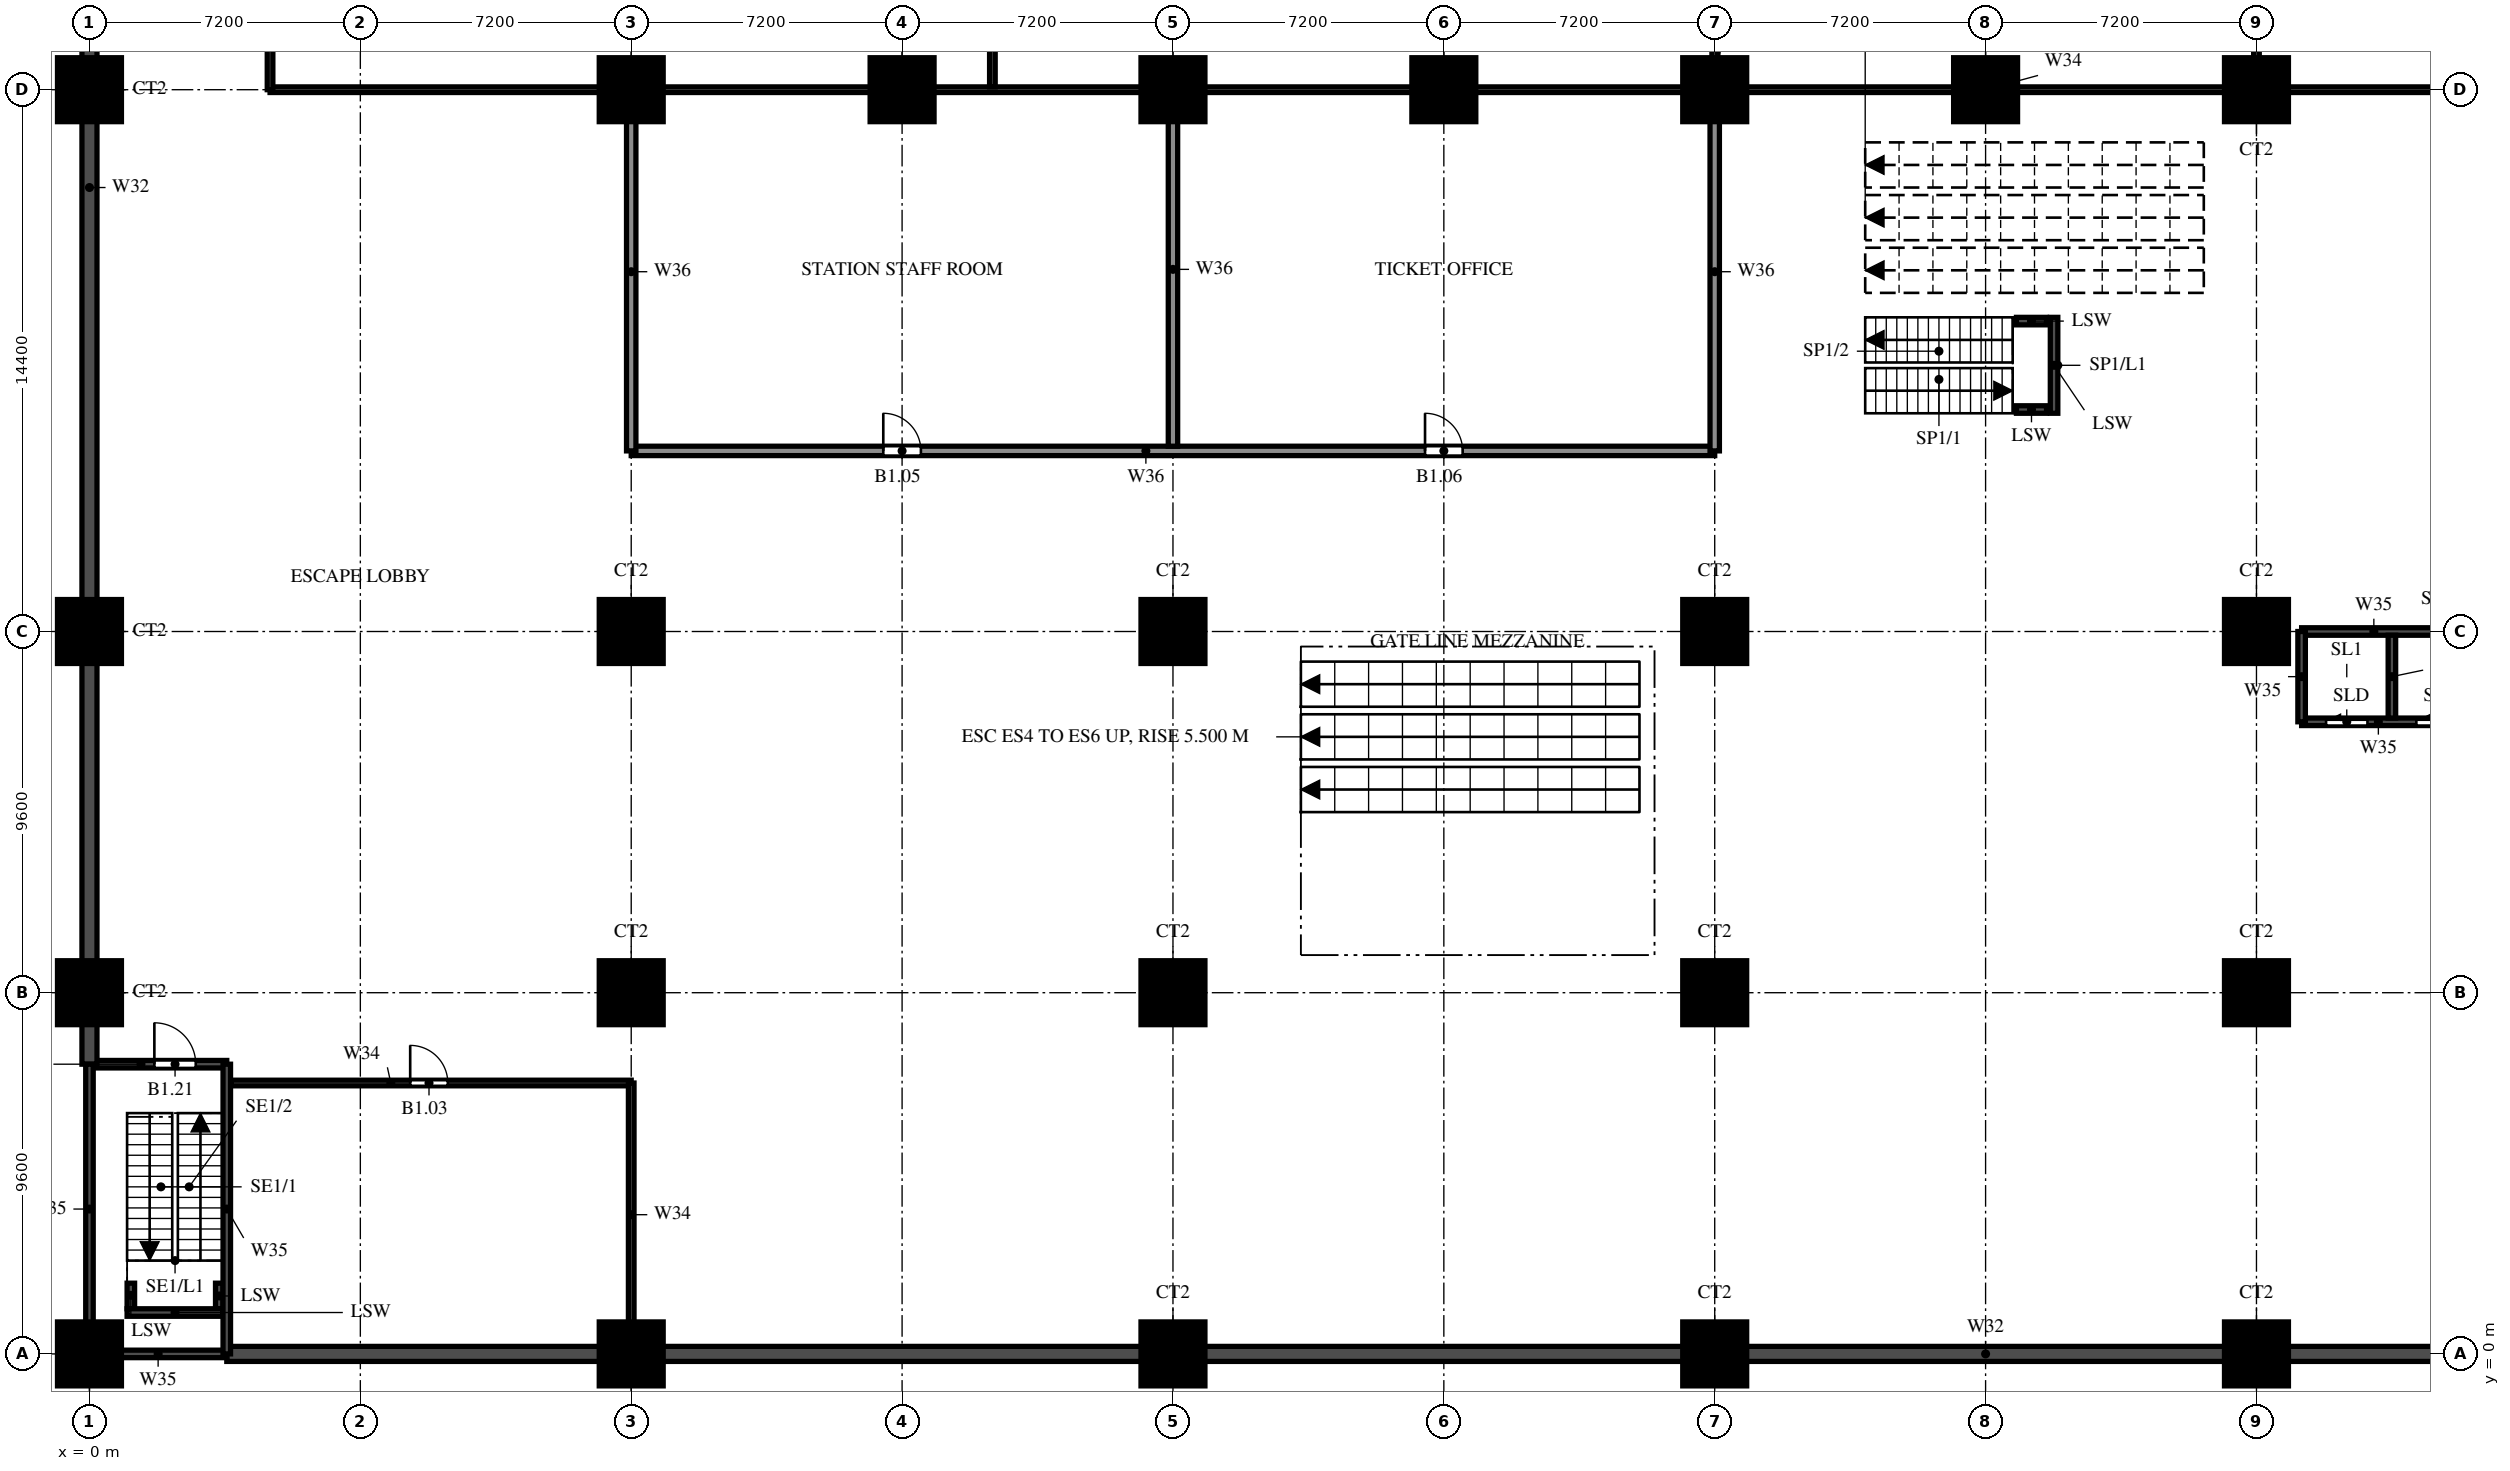
"""IFC4 building model, lengths in metres.
Left out: names, types, materials, properties, quantities, classifications, styles, units other than length and angle.
Written with IfcOpenShell. Run it as: python <this file> out.ifc"""

import sys

from ifc_helpers import new_model, si_unit, direction, frame, frame_2d, origin, origin_with_axes, origin_2d, place, context, subcontext, project, spatial, rectangle, extrude, source, transform, mapped, element, fill, save


model = new_model("IFC4")
c1 = context("Model", 3, precision=1e-05, world=origin(), true_north=direction((0.0, 1.0)))
c2 = subcontext(c1, "Body", "Model", "MODEL_VIEW")
j1 = project(units=[si_unit("LENGTHUNIT", "METRE"), si_unit("PLANEANGLEUNIT", "RADIAN")], contexts=[c1])
p1 = place(None, origin())
s1 = spatial("IfcSite", under=j1, at=p1, CompositionType="ELEMENT")
p2 = place(p1, origin())
s2 = spatial("IfcBuilding", under=s1, at=p2, CompositionType="ELEMENT")
p3 = place(p2, frame((0.0, 0.0, -5.4)))
s3 = spatial("IfcBuildingStorey", under=s2, at=p3, CompositionType="ELEMENT", Elevation=-5.4)
m1 = source(origin(), c2, "Body", "SweptSolid", [
    extrude(rectangle(XDim=1.7, YDim=1.7, at=origin_2d()), origin(), (0.0, 0.0, 1.0), 5.0),
])
for number, where, z_axis, x_axis in (
    (1, (0.0, 0.0, 0.0), (0.0, 0.0, 1.0), (1.0, 0.0, 0.0)),
    (2, (14.4, 0.0, 0.0), (0.0, 0.0, 1.0), (1.0, 0.0, 0.0)),
    (3, (28.8, 0.0, 0.0), (0.0, 0.0, 1.0), (1.0, 0.0, 0.0)),
    (4, (43.2, 0.0, 0.0), (0.0, 0.0, 1.0), (1.0, 0.0, 0.0)),
    (5, (57.6, 0.0, 0.0), (0.0, 0.0, 1.0), (1.0, 0.0, 0.0)),
    (6, (0.0, 9.6, 0.0), (0.0, 0.0, 1.0), (1.0, 0.0, 0.0)),
    (7, (14.4, 9.6, 0.0), (0.0, 0.0, 1.0), (1.0, 0.0, 0.0)),
    (8, (28.8, 9.6, 0.0), (0.0, 0.0, 1.0), (1.0, 0.0, 0.0)),
    (9, (43.2, 9.6, 0.0), (0.0, 0.0, 1.0), (1.0, 0.0, 0.0)),
    (10, (57.6, 9.6, 0.0), (0.0, 0.0, 1.0), (1.0, 0.0, 0.0)),
    (11, (0.0, 19.2, 0.0), (0.0, 0.0, 1.0), (1.0, 0.0, 0.0)),
    (12, (14.4, 19.2, 0.0), (0.0, 0.0, 1.0), (1.0, 0.0, 0.0)),
    (13, (28.8, 19.2, 0.0), (0.0, 0.0, 1.0), (1.0, 0.0, 0.0)),
    (14, (43.2, 19.2, 0.0), (0.0, 0.0, 1.0), (1.0, 0.0, 0.0)),
    (15, (57.6, 19.2, 0.0), (0.0, 0.0, 1.0), (1.0, 0.0, 0.0)),
    (16, (0.0, 33.6, 0.0), (0.0, 0.0, 1.0), (1.0, 0.0, 0.0)),
    (17, (14.4, 33.6, 0.0), (0.0, 0.0, 1.0), (1.0, 0.0, 0.0)),
    (18, (21.6, 33.6, 0.0), (0.0, 0.0, 1.0), (1.0, 0.0, 0.0)),
    (19, (28.8, 33.6, 0.0), (0.0, 0.0, 1.0), (1.0, 0.0, 0.0)),
    (20, (36.0, 33.6, 0.0), (0.0, 0.0, 1.0), (1.0, 0.0, 0.0)),
    (21, (43.2, 33.6, 0.0), (0.0, 0.0, 1.0), (1.0, 0.0, 0.0)),
    (22, (50.4, 33.6, 0.0), (0.0, 0.0, 1.0), (1.0, 0.0, 0.0)),
    (23, (57.6, 33.6, 0.0), (0.0, 0.0, 1.0), (1.0, 0.0, 0.0)),
):
    element("IfcColumn", number, at=place(p3, frame(where, z_axis=z_axis, x_axis=x_axis)), inside=s3, PredefinedType="COLUMN", context=c2, shape_type="MappedRepresentation", body=[
        mapped(m1, transform((0.0, 0.0, 0.0))),
    ])
for number, where, z_axis, x_axis in (
    (24, (1.1, 1.2, 0.0), (0.0, 0.0, 1.0), (0.0, 1.0, 0.0)),
    (25, (3.45, 1.2, 0.0), (0.0, 0.0, 1.0), (0.0, 1.0, 0.0)),
):
    element("IfcWall", number, at=place(p3, frame(where, z_axis=z_axis, x_axis=x_axis)), inside=s3, PredefinedType="SOLIDWALL", context=c2, shape_type="SweptSolid", body=[
        extrude(rectangle(XDim=0.68, YDim=0.2, at=frame_2d((0.34, 0.0))), origin(), (0.0, 0.0, 1.0), 2.5),
    ])
p4 = place(p3, frame((1.0, 1.1, 0.0), z_axis=(0.0, 0.0, 1.0), x_axis=(1.0, 0.0, 0.0)))
e26 = element("IfcWall", 26, at=p4, inside=s3, PredefinedType="SOLIDWALL", context=c2, shape_type="SweptSolid", body=[
    extrude(rectangle(XDim=2.55, YDim=0.2, at=frame_2d((1.275, 0.0))), origin(), (0.0, 0.0, 1.0), 2.5),
])
for number, where, z_axis, x_axis in (
    (27, (51.22, 25.1, 0.0), (0.0, 0.0, 1.0), (1.0, 0.0, 0.0)),
    (28, (51.22, 27.45, 0.0), (0.0, 0.0, 1.0), (1.0, 0.0, 0.0)),
):
    element("IfcWall", number, at=place(p3, frame(where, z_axis=z_axis, x_axis=x_axis)), inside=s3, PredefinedType="SOLIDWALL", context=c2, shape_type="SweptSolid", body=[
        extrude(rectangle(XDim=0.8, YDim=0.2, at=frame_2d((0.4, 0.0))), origin(), (0.0, 0.0, 1.0), 2.5),
    ])
p5 = place(p3, frame((52.22, 25.0, 0.0), z_axis=(0.0, 0.0, 1.0), x_axis=(0.0, 1.0, 0.0)))
e29 = element("IfcWall", 29, at=p5, inside=s3, PredefinedType="SOLIDWALL", context=c2, shape_type="SweptSolid", body=[
    extrude(rectangle(XDim=2.55, YDim=0.2, at=frame_2d((1.275, 0.0))), origin(), (0.0, 0.0, 1.0), 2.5),
])
p6 = place(p3, frame((3.65, 0.0, 0.0), z_axis=(0.0, 0.0, 1.0), x_axis=(1.0, 0.0, 0.0)))
e30 = element("IfcWall", 30, at=p6, inside=s3, PredefinedType="SOLIDWALL", context=c2, shape_type="SweptSolid", body=[
    extrude(rectangle(XDim=93.5, YDim=0.4, at=frame_2d((46.75, 0.0))), origin(), (0.0, 0.0, 1.0), 5.0),
])
p7 = place(p3, origin_with_axes())
e31 = element("IfcWall", 31, at=p7, inside=s3, PredefinedType="SOLIDWALL", context=c2, shape_type="SweptSolid", body=[
    extrude(rectangle(XDim=3.65, YDim=0.2, at=frame_2d((1.825, 0.0))), origin(), (0.0, 0.0, 1.0), 5.0),
])
p8 = place(p3, frame((3.75, 7.2, 0.0), z_axis=(0.0, 0.0, 1.0), x_axis=(1.0, 0.0, 0.0)))
e32 = element("IfcWall", 32, at=p8, inside=s3, PredefinedType="PARTITIONING", context=c2, shape_type="SweptSolid", body=[
    extrude(rectangle(XDim=10.65, YDim=0.15, at=frame_2d((5.325, 0.0))), origin(), (0.0, 0.0, 1.0), 3.8),
])
p9 = place(p8, frame((4.775, 0.0, 0.0)))
e33 = element("IfcOpeningElement", 33, at=p9, cuts=e32, PredefinedType="OPENING", context=c2, shape_type="SweptSolid", body=[
    extrude(rectangle(XDim=1.0, YDim=2.1, at=frame_2d((0.5, 1.05))), frame((0.0, 0.085, 0.0), z_axis=(0.0, -1.0, 0.0), x_axis=(1.0, 0.0, 0.0)), (0.0, 0.0, 1.0), 0.17),
])
p10 = place(p3, frame((0.0, 7.7, 0.0), z_axis=(0.0, 0.0, 1.0), x_axis=(1.0, 0.0, 0.0)))
e34 = element("IfcWall", 34, at=p10, inside=s3, PredefinedType="SOLIDWALL", context=c2, shape_type="SweptSolid", body=[
    extrude(rectangle(XDim=3.65, YDim=0.2, at=frame_2d((1.825, 0.0))), origin(), (0.0, 0.0, 1.0), 5.0),
])
p11 = place(p10, frame((1.725, 0.0, 0.0)))
e35 = element("IfcOpeningElement", 35, at=p11, cuts=e34, PredefinedType="OPENING", context=c2, shape_type="SweptSolid", body=[
    extrude(rectangle(XDim=1.1, YDim=2.1, at=frame_2d((0.55, 1.05))), frame((0.0, 0.11, 0.0), z_axis=(0.0, -1.0, 0.0), x_axis=(1.0, 0.0, 0.0)), (0.0, 0.0, 1.0), 0.22),
])
p12 = place(p3, frame((58.8, 16.8, 0.0), z_axis=(0.0, 0.0, 1.0), x_axis=(1.0, 0.0, 0.0)))
e36 = element("IfcWall", 36, at=p12, inside=s3, PredefinedType="SOLIDWALL", context=c2, shape_type="SweptSolid", body=[
    extrude(rectangle(XDim=4.8, YDim=0.2, at=frame_2d((2.4, 0.0))), origin(), (0.0, 0.0, 1.0), 5.0),
])
p13 = place(p12, frame((0.65, 0.0, 0.0)))
e37 = element("IfcOpeningElement", 37, at=p13, cuts=e36, PredefinedType="OPENING", context=c2, shape_type="SweptSolid", body=[
    extrude(rectangle(XDim=1.1, YDim=2.1, at=frame_2d((0.55, 1.05))), frame((0.0, 0.11, 0.0), z_axis=(0.0, -1.0, 0.0), x_axis=(1.0, 0.0, 0.0)), (0.0, 0.0, 1.0), 0.22),
])
p14 = place(p12, frame((3.05, 0.0, 0.0)))
e38 = element("IfcOpeningElement", 38, at=p14, cuts=e36, PredefinedType="OPENING", context=c2, shape_type="SweptSolid", body=[
    extrude(rectangle(XDim=1.1, YDim=2.1, at=frame_2d((0.55, 1.05))), frame((0.0, 0.11, 0.0), z_axis=(0.0, -1.0, 0.0), x_axis=(1.0, 0.0, 0.0)), (0.0, 0.0, 1.0), 0.22),
])
p15 = place(p3, frame((58.8, 19.2, 0.0), z_axis=(0.0, 0.0, 1.0), x_axis=(1.0, 0.0, 0.0)))
e39 = element("IfcWall", 39, at=p15, inside=s3, PredefinedType="SOLIDWALL", context=c2, shape_type="SweptSolid", body=[
    extrude(rectangle(XDim=4.8, YDim=0.2, at=frame_2d((2.4, 0.0))), origin(), (0.0, 0.0, 1.0), 5.0),
])
p16 = place(p3, frame((14.4, 24.0, 0.0), z_axis=(0.0, 0.0, 1.0), x_axis=(1.0, 0.0, 0.0)))
e40 = element("IfcWall", 40, at=p16, inside=s3, PredefinedType="SOLIDWALL", context=c2, shape_type="SweptSolid", body=[
    extrude(rectangle(XDim=28.8, YDim=0.25, at=frame_2d((14.4, 0.0))), origin(), (0.0, 0.0, 1.0), 3.8),
])
p17 = place(p16, frame((6.7, 0.0, 0.0)))
e41 = element("IfcOpeningElement", 41, at=p17, cuts=e40, PredefinedType="OPENING", context=c2, shape_type="SweptSolid", body=[
    extrude(rectangle(XDim=1.0, YDim=2.1, at=frame_2d((0.5, 1.05))), frame((0.0, 0.135, 0.0), z_axis=(0.0, -1.0, 0.0), x_axis=(1.0, 0.0, 0.0)), (0.0, 0.0, 1.0), 0.27),
])
p18 = place(p16, frame((21.1, 0.0, 0.0)))
e42 = element("IfcOpeningElement", 42, at=p18, cuts=e40, PredefinedType="OPENING", context=c2, shape_type="SweptSolid", body=[
    extrude(rectangle(XDim=1.0, YDim=2.1, at=frame_2d((0.5, 1.05))), frame((0.0, 0.135, 0.0), z_axis=(0.0, -1.0, 0.0), x_axis=(1.0, 0.0, 0.0)), (0.0, 0.0, 1.0), 0.27),
])
p19 = place(p3, frame((4.8, 33.6, 0.0), z_axis=(0.0, 0.0, 1.0), x_axis=(1.0, 0.0, 0.0)))
e43 = element("IfcWall", 43, at=p19, inside=s3, PredefinedType="PARTITIONING", context=c2, shape_type="SweptSolid", body=[
    extrude(rectangle(XDim=91.2, YDim=0.15, at=frame_2d((45.6, 0.0))), origin(), (0.0, 0.0, 1.0), 3.8),
])
p20 = place(p3, frame((0.0, 7.7, 0.0), z_axis=(0.0, 0.0, 1.0), x_axis=(0.0, 1.0, 0.0)))
e44 = element("IfcWall", 44, at=p20, inside=s3, PredefinedType="SOLIDWALL", context=c2, shape_type="SweptSolid", body=[
    extrude(rectangle(XDim=46.6, YDim=0.4, at=frame_2d((23.3, 0.0))), origin(), (0.0, 0.0, 1.0), 5.0),
])
for number, where, z_axis, x_axis in (
    (45, (0.0, 0.0, 0.0), (0.0, 0.0, 1.0), (0.0, 1.0, 0.0)),
    (46, (3.65, 0.0, 0.0), (0.0, 0.0, 1.0), (0.0, 1.0, 0.0)),
):
    element("IfcWall", number, at=place(p3, frame(where, z_axis=z_axis, x_axis=x_axis)), inside=s3, PredefinedType="SOLIDWALL", context=c2, shape_type="SweptSolid", body=[
        extrude(rectangle(XDim=7.7, YDim=0.2, at=frame_2d((3.85, 0.0))), origin(), (0.0, 0.0, 1.0), 5.0),
    ])
p21 = place(p3, frame((4.8, 33.6, 0.0), z_axis=(0.0, 0.0, 1.0), x_axis=(0.0, 1.0, 0.0)))
e47 = element("IfcWall", 47, at=p21, inside=s3, PredefinedType="PARTITIONING", context=c2, shape_type="SweptSolid", body=[
    extrude(rectangle(XDim=15.9, YDim=0.15, at=frame_2d((7.95, 0.0))), origin(), (0.0, 0.0, 1.0), 3.8),
])
p22 = place(p3, frame((14.4, 0.2, 0.0), z_axis=(0.0, 0.0, 1.0), x_axis=(0.0, 1.0, 0.0)))
e48 = element("IfcWall", 48, at=p22, inside=s3, PredefinedType="PARTITIONING", context=c2, shape_type="SweptSolid", body=[
    extrude(rectangle(XDim=7.0, YDim=0.15, at=frame_2d((3.5, 0.0))), origin(), (0.0, 0.0, 1.0), 3.8),
])
p23 = place(p3, frame((14.4, 24.0, 0.0), z_axis=(0.0, 0.0, 1.0), x_axis=(0.0, 1.0, 0.0)))
e49 = element("IfcWall", 49, at=p23, inside=s3, PredefinedType="SOLIDWALL", context=c2, shape_type="SweptSolid", body=[
    extrude(rectangle(XDim=9.525, YDim=0.25, at=frame_2d((4.762, 0.0))), origin(), (0.0, 0.0, 1.0), 3.8),
])
p24 = place(p3, frame((24.0, 33.675, 0.0), z_axis=(0.0, 0.0, 1.0), x_axis=(0.0, 1.0, 0.0)))
e50 = element("IfcWall", 50, at=p24, inside=s3, PredefinedType="PARTITIONING", context=c2, shape_type="SweptSolid", body=[
    extrude(rectangle(XDim=15.75, YDim=0.15, at=frame_2d((7.875, 0.0))), origin(), (0.0, 0.0, 1.0), 4.1),
])
p25 = place(p3, frame((28.8, 24.125, 0.0), z_axis=(0.0, 0.0, 1.0), x_axis=(0.0, 1.0, 0.0)))
e51 = element("IfcWall", 51, at=p25, inside=s3, PredefinedType="SOLIDWALL", context=c2, shape_type="SweptSolid", body=[
    extrude(rectangle(XDim=9.4, YDim=0.25, at=frame_2d((4.7, 0.0))), origin(), (0.0, 0.0, 1.0), 3.8),
])
p26 = place(p3, frame((43.2, 33.675, 0.0), z_axis=(0.0, 0.0, 1.0), x_axis=(0.0, 1.0, 0.0)))
e52 = element("IfcWall", 52, at=p26, inside=s3, PredefinedType="PARTITIONING", context=c2, shape_type="SweptSolid", body=[
    extrude(rectangle(XDim=15.75, YDim=0.15, at=frame_2d((7.875, 0.0))), origin(), (0.0, 0.0, 1.0), 3.8),
])
p27 = place(p3, frame((43.2, 24.0, 0.0), z_axis=(0.0, 0.0, 1.0), x_axis=(0.0, 1.0, 0.0)))
e53 = element("IfcWall", 53, at=p27, inside=s3, PredefinedType="SOLIDWALL", context=c2, shape_type="SweptSolid", body=[
    extrude(rectangle(XDim=9.525, YDim=0.25, at=frame_2d((4.762, 0.0))), origin(), (0.0, 0.0, 1.0), 3.8),
])
p28 = place(p3, frame((57.6, 33.675, 0.0), z_axis=(0.0, 0.0, 1.0), x_axis=(0.0, 1.0, 0.0)))
e54 = element("IfcWall", 54, at=p28, inside=s3, PredefinedType="PARTITIONING", context=c2, shape_type="SweptSolid", body=[
    extrude(rectangle(XDim=15.75, YDim=0.15, at=frame_2d((7.875, 0.0))), origin(), (0.0, 0.0, 1.0), 3.8),
])
p29 = place(p3, frame((58.8, 16.8, 0.0), z_axis=(0.0, 0.0, 1.0), x_axis=(0.0, 1.0, 0.0)))
e55 = element("IfcWall", 55, at=p29, inside=s3, PredefinedType="SOLIDWALL", context=c2, shape_type="SweptSolid", body=[
    extrude(rectangle(XDim=2.4, YDim=0.2, at=frame_2d((1.2, 0.0))), origin(), (0.0, 0.0, 1.0), 5.0),
])
p30 = place(p3, frame((61.2, 16.9, 0.0), z_axis=(0.0, 0.0, 1.0), x_axis=(0.0, 1.0, 0.0)))
e56 = element("IfcWall", 56, at=p30, inside=s3, PredefinedType="SOLIDWALL", context=c2, shape_type="SweptSolid", body=[
    extrude(rectangle(XDim=2.2, YDim=0.2, at=frame_2d((1.1, 0.0))), origin(), (0.0, 0.0, 1.0), 5.0),
])
p31 = place(p13, origin())
e57 = element("IfcDoor", 57, at=p31, inside=s3, OperationType="SLIDING_TO_LEFT", PredefinedType="DOOR", context=c2, shape_type="SweptSolid", body=[
    extrude(rectangle(XDim=1.1, YDim=2.1, at=frame_2d((0.55, 1.05))), frame((0.0, 0.025, 0.0), z_axis=(0.0, -1.0, 0.0), x_axis=(1.0, 0.0, 0.0)), (0.0, 0.0, 1.0), 0.05),
])
fill(e37, e57)
p32 = place(p14, origin())
e58 = element("IfcDoor", 58, at=p32, inside=s3, OperationType="SLIDING_TO_LEFT", PredefinedType="DOOR", context=c2, shape_type="SweptSolid", body=[
    extrude(rectangle(XDim=1.1, YDim=2.1, at=frame_2d((0.55, 1.05))), frame((0.0, 0.025, 0.0), z_axis=(0.0, -1.0, 0.0), x_axis=(1.0, 0.0, 0.0)), (0.0, 0.0, 1.0), 0.05),
])
fill(e38, e58)
p33 = place(p9, origin())
e59 = element("IfcDoor", 59, at=p33, inside=s3, OperationType="SINGLE_SWING_LEFT", PredefinedType="DOOR", context=c2, shape_type="SweptSolid", body=[
    extrude(rectangle(XDim=1.0, YDim=2.1, at=frame_2d((0.5, 1.05))), frame((0.0, 0.025, 0.0), z_axis=(0.0, -1.0, 0.0), x_axis=(1.0, 0.0, 0.0)), (0.0, 0.0, 1.0), 0.05),
])
fill(e33, e59)
p34 = place(p17, origin())
e60 = element("IfcDoor", 60, at=p34, inside=s3, OperationType="SINGLE_SWING_LEFT", PredefinedType="DOOR", context=c2, shape_type="SweptSolid", body=[
    extrude(rectangle(XDim=1.0, YDim=2.1, at=frame_2d((0.5, 1.05))), frame((0.0, 0.025, 0.0), z_axis=(0.0, -1.0, 0.0), x_axis=(1.0, 0.0, 0.0)), (0.0, 0.0, 1.0), 0.05),
])
fill(e41, e60)
p35 = place(p18, origin())
e61 = element("IfcDoor", 61, at=p35, inside=s3, OperationType="SINGLE_SWING_RIGHT", PredefinedType="DOOR", context=c2, shape_type="SweptSolid", body=[
    extrude(rectangle(XDim=1.0, YDim=2.1, at=frame_2d((0.5, 1.05))), frame((0.0, 0.025, 0.0), z_axis=(0.0, -1.0, 0.0), x_axis=(1.0, 0.0, 0.0)), (0.0, 0.0, 1.0), 0.05),
])
fill(e42, e61)
p36 = place(p11, origin())
e62 = element("IfcDoor", 62, at=p36, inside=s3, OperationType="SINGLE_SWING_RIGHT", PredefinedType="DOOR", context=c2, shape_type="SweptSolid", body=[
    extrude(rectangle(XDim=1.1, YDim=2.1, at=frame_2d((0.55, 1.05))), frame((0.0, 0.025, 0.0), z_axis=(0.0, -1.0, 0.0), x_axis=(1.0, 0.0, 0.0)), (0.0, 0.0, 1.0), 0.05),
])
fill(e35, e62)
save(model, sys.argv[1])
